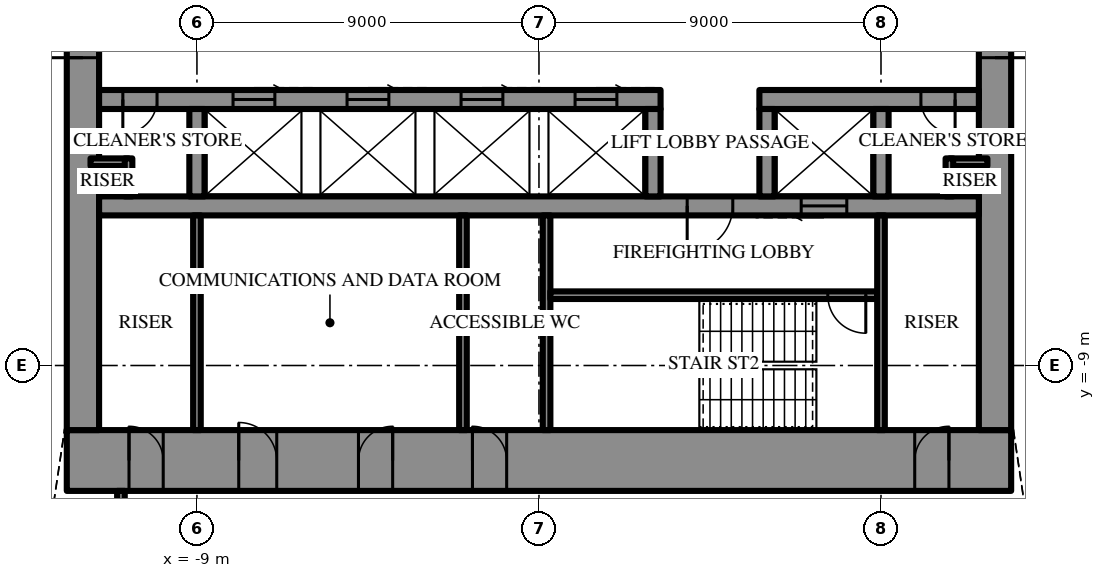
"""IFC4 building model, lengths in metres.
Left out: names, types, materials, properties, quantities, classifications, styles, units other than length and angle.
Written with IfcOpenShell. Run it as: python <this file> out.ifc"""

import sys

from ifc_helpers import new_model, si_unit, direction, frame, frame_2d, origin, place, context, subcontext, project, spatial, rectangle, extrude, element, fill, save


model = new_model("IFC4")
c1 = context("Model", 3, precision=1e-05, world=origin(), true_north=direction((0.0, 1.0)))
c2 = subcontext(c1, "Body", "Model", "MODEL_VIEW")
j1 = project(units=[si_unit("LENGTHUNIT", "METRE"), si_unit("PLANEANGLEUNIT", "RADIAN")], contexts=[c1])
p1 = place(None, origin())
s1 = spatial("IfcSite", under=j1, at=p1, CompositionType="ELEMENT")
p2 = place(p1, origin())
s2 = spatial("IfcBuilding", under=s1, at=p2, CompositionType="ELEMENT")
p3 = place(p2, frame((0.0, 0.0, 315.7)))
s3 = spatial("IfcBuildingStorey", under=s2, at=p3, CompositionType="ELEMENT", Elevation=315.7)
p4 = place(p3, frame((12.425, -11.5, 0.0), z_axis=(0.0, 0.0, 1.0), x_axis=(-1.0, 0.0, 0.0)))
e1 = element("IfcWall", 1, at=p4, inside=s3, PredefinedType="SHEAR", context=c2, shape_type="SweptSolid", body=[
    extrude(rectangle(XDim=24.85, YDim=1.6, at=frame_2d((12.425, 0.0))), origin(), (0.0, 0.0, 1.0), 4.2),
])
p5 = place(p4, frame((13.275, 0.0, 0.0)))
e2 = element("IfcOpeningElement", 2, at=p5, cuts=e1, PredefinedType="OPENING", context=c2, shape_type="SweptSolid", body=[
    extrude(rectangle(XDim=0.9, YDim=2.2, at=frame_2d((0.45, 1.1))), frame((0.0, 0.81, 0.0), z_axis=(0.0, -1.0, 0.0), x_axis=(1.0, 0.0, 0.0)), (0.0, 0.0, 1.0), 1.62),
])
p6 = place(p4, frame((16.275, 0.0, 0.0)))
e3 = element("IfcOpeningElement", 3, at=p6, cuts=e1, PredefinedType="OPENING", context=c2, shape_type="SweptSolid", body=[
    extrude(rectangle(XDim=0.9, YDim=2.2, at=frame_2d((0.45, 1.1))), frame((0.0, 0.81, 0.0), z_axis=(0.0, -1.0, 0.0), x_axis=(1.0, 0.0, 0.0)), (0.0, 0.0, 1.0), 1.62),
])
p7 = place(p4, frame((19.325, 0.0, 0.0)))
e4 = element("IfcOpeningElement", 4, at=p7, cuts=e1, PredefinedType="OPENING", context=c2, shape_type="SweptSolid", body=[
    extrude(rectangle(XDim=1.0, YDim=2.2, at=frame_2d((0.5, 1.1))), frame((0.0, 0.81, 0.0), z_axis=(0.0, -1.0, 0.0), x_axis=(1.0, 0.0, 0.0)), (0.0, 0.0, 1.0), 1.62),
])
p8 = place(p4, frame((1.637, 0.0, 0.0)))
e5 = element("IfcOpeningElement", 5, at=p8, cuts=e1, PredefinedType="OPENING", context=c2, shape_type="SweptSolid", body=[
    extrude(rectangle(XDim=0.9, YDim=2.2, at=frame_2d((0.45, 1.1))), frame((0.0, 0.81, 0.0), z_axis=(0.0, -1.0, 0.0), x_axis=(1.0, 0.0, 0.0)), (0.0, 0.0, 1.0), 1.62),
])
p9 = place(p4, frame((22.312, 0.0, 0.0)))
e6 = element("IfcOpeningElement", 6, at=p9, cuts=e1, PredefinedType="OPENING", context=c2, shape_type="SweptSolid", body=[
    extrude(rectangle(XDim=0.9, YDim=2.2, at=frame_2d((0.45, 1.1))), frame((0.0, 0.81, 0.0), z_axis=(0.0, -1.0, 0.0), x_axis=(1.0, 0.0, 0.0)), (0.0, 0.0, 1.0), 1.62),
])
p10 = place(p3, frame((12.0, -10.7, 0.0), z_axis=(0.0, 0.0, 1.0), x_axis=(0.0, 1.0, 0.0)))
e7 = element("IfcWall", 7, at=p10, inside=s3, PredefinedType="SHEAR", context=c2, shape_type="SweptSolid", body=[
    extrude(rectangle(XDim=21.4, YDim=0.85, at=frame_2d((10.7, 0.0))), origin(), (0.0, 0.0, 1.0), 4.2),
])
p11 = place(p10, frame((9.8, 0.0, 0.0)))
e8 = element("IfcOpeningElement", 8, at=p11, cuts=e7, PredefinedType="OPENING", context=c2, shape_type="SweptSolid", body=[
    extrude(rectangle(XDim=1.8, YDim=2.4, at=frame_2d((0.9, 1.2))), frame((0.0, 0.435, 0.0), z_axis=(0.0, -1.0, 0.0), x_axis=(1.0, 0.0, 0.0)), (0.0, 0.0, 1.0), 0.87),
])
p12 = place(p3, frame((-12.0, 10.7, 0.0), z_axis=(0.0, 0.0, 1.0), x_axis=(0.0, -1.0, 0.0)))
e9 = element("IfcWall", 9, at=p12, inside=s3, PredefinedType="SHEAR", context=c2, shape_type="SweptSolid", body=[
    extrude(rectangle(XDim=21.4, YDim=0.85, at=frame_2d((10.7, 0.0))), origin(), (0.0, 0.0, 1.0), 4.2),
])
p13 = place(p12, frame((9.8, 0.0, 0.0)))
e10 = element("IfcOpeningElement", 10, at=p13, cuts=e9, PredefinedType="OPENING", context=c2, shape_type="SweptSolid", body=[
    extrude(rectangle(XDim=1.8, YDim=2.4, at=frame_2d((0.9, 1.2))), frame((0.0, 0.435, 0.0), z_axis=(0.0, -1.0, 0.0), x_axis=(1.0, 0.0, 0.0)), (0.0, 0.0, 1.0), 0.87),
])
p14 = place(p3, frame((11.575, -2.0, 0.0), z_axis=(0.0, 0.0, 1.0), x_axis=(-1.0, 0.0, 0.0)))
e11 = element("IfcWall", 11, at=p14, inside=s3, PredefinedType="SHEAR", context=c2, shape_type="SweptSolid", body=[
    extrude(rectangle(XDim=5.775, YDim=0.5, at=frame_2d((2.887, 0.0))), origin(), (0.0, 0.0, 1.0), 4.2),
])
p15 = place(p14, frame((0.625, 0.0, 0.0)))
e12 = element("IfcOpeningElement", 12, at=p15, cuts=e11, PredefinedType="OPENING", context=c2, shape_type="SweptSolid", body=[
    extrude(rectangle(XDim=0.9, YDim=2.2, at=frame_2d((0.45, 1.1))), frame((0.0, 0.26, 0.0), z_axis=(0.0, -1.0, 0.0), x_axis=(1.0, 0.0, 0.0)), (0.0, 0.0, 1.0), 0.52),
])
p16 = place(p3, frame((3.2, -2.0, 0.0), z_axis=(0.0, 0.0, 1.0), x_axis=(-1.0, 0.0, 0.0)))
e13 = element("IfcWall", 13, at=p16, inside=s3, PredefinedType="SHEAR", context=c2, shape_type="SweptSolid", body=[
    extrude(rectangle(XDim=14.775, YDim=0.5, at=frame_2d((7.387, 0.0))), origin(), (0.0, 0.0, 1.0), 4.2),
])
p17 = place(p16, frame((13.25, 0.0, 0.0)))
e14 = element("IfcOpeningElement", 14, at=p17, cuts=e13, PredefinedType="OPENING", context=c2, shape_type="SweptSolid", body=[
    extrude(rectangle(XDim=0.9, YDim=2.2, at=frame_2d((0.45, 1.1))), frame((0.0, 0.26, 0.0), z_axis=(0.0, -1.0, 0.0), x_axis=(1.0, 0.0, 0.0)), (0.0, 0.0, 1.0), 0.52),
])
p18 = place(p16, frame((1.15, 0.0, 0.0)))
e15 = element("IfcOpeningElement", 15, at=p18, cuts=e13, PredefinedType="OPENING", context=c2, shape_type="SweptSolid", body=[
    extrude(rectangle(XDim=1.1, YDim=2.2, at=frame_2d((0.55, 1.1))), frame((0.0, 0.26, 0.0), z_axis=(0.0, -1.0, 0.0), x_axis=(1.0, 0.0, 0.0)), (0.0, 0.0, 1.0), 0.52),
])
p19 = place(p16, frame((4.15, 0.0, 0.0)))
e16 = element("IfcOpeningElement", 16, at=p19, cuts=e13, PredefinedType="OPENING", context=c2, shape_type="SweptSolid", body=[
    extrude(rectangle(XDim=1.1, YDim=2.2, at=frame_2d((0.55, 1.1))), frame((0.0, 0.26, 0.0), z_axis=(0.0, -1.0, 0.0), x_axis=(1.0, 0.0, 0.0)), (0.0, 0.0, 1.0), 0.52),
])
p20 = place(p16, frame((7.15, 0.0, 0.0)))
e17 = element("IfcOpeningElement", 17, at=p20, cuts=e13, PredefinedType="OPENING", context=c2, shape_type="SweptSolid", body=[
    extrude(rectangle(XDim=1.1, YDim=2.2, at=frame_2d((0.55, 1.1))), frame((0.0, 0.26, 0.0), z_axis=(0.0, -1.0, 0.0), x_axis=(1.0, 0.0, 0.0)), (0.0, 0.0, 1.0), 0.52),
])
p21 = place(p16, frame((10.15, 0.0, 0.0)))
e18 = element("IfcOpeningElement", 18, at=p21, cuts=e13, PredefinedType="OPENING", context=c2, shape_type="SweptSolid", body=[
    extrude(rectangle(XDim=1.1, YDim=2.2, at=frame_2d((0.55, 1.1))), frame((0.0, 0.26, 0.0), z_axis=(0.0, -1.0, 0.0), x_axis=(1.0, 0.0, 0.0)), (0.0, 0.0, 1.0), 0.52),
])
p22 = place(p3, frame((11.575, -4.8, 0.0), z_axis=(0.0, 0.0, 1.0), x_axis=(-1.0, 0.0, 0.0)))
e19 = element("IfcWall", 19, at=p22, inside=s3, PredefinedType="SHEAR", context=c2, shape_type="SweptSolid", body=[
    extrude(rectangle(XDim=23.15, YDim=0.5, at=frame_2d((11.575, 0.0))), origin(), (0.0, 0.0, 1.0), 4.2),
])
p23 = place(p22, frame((6.475, 0.0, 0.0)))
e20 = element("IfcOpeningElement", 20, at=p23, cuts=e19, PredefinedType="OPENING", context=c2, shape_type="SweptSolid", body=[
    extrude(rectangle(XDim=1.2, YDim=2.2, at=frame_2d((0.6, 1.1))), frame((0.0, 0.26, 0.0), z_axis=(0.0, -1.0, 0.0), x_axis=(1.0, 0.0, 0.0)), (0.0, 0.0, 1.0), 0.52),
])
p24 = place(p22, frame((3.475, 0.0, 0.0)))
e21 = element("IfcOpeningElement", 21, at=p24, cuts=e19, PredefinedType="OPENING", context=c2, shape_type="SweptSolid", body=[
    extrude(rectangle(XDim=1.2, YDim=2.2, at=frame_2d((0.6, 1.1))), frame((0.0, 0.26, 0.0), z_axis=(0.0, -1.0, 0.0), x_axis=(1.0, 0.0, 0.0)), (0.0, 0.0, 1.0), 0.52),
])
for number, where, z_axis, x_axis in (
    (22, (9.0, -2.25, 0.0), (0.0, 0.0, 1.0), (0.0, -1.0, 0.0)),
    (23, (6.0, -2.25, 0.0), (0.0, 0.0, 1.0), (0.0, -1.0, 0.0)),
    (24, (3.0, -2.25, 0.0), (0.0, 0.0, 1.0), (0.0, -1.0, 0.0)),
    (25, (-9.0, -2.25, 0.0), (0.0, 0.0, 1.0), (0.0, -1.0, 0.0)),
):
    element("IfcWall", number, at=place(p3, frame(where, z_axis=z_axis, x_axis=x_axis)), inside=s3, PredefinedType="SHEAR", context=c2, shape_type="SweptSolid", body=[
        extrude(rectangle(XDim=2.3, YDim=0.4, at=frame_2d((1.15, 0.0))), origin(), (0.0, 0.0, 1.0), 4.2),
    ])
p25 = place(p3, frame((0.2, -5.05, 0.0), z_axis=(0.0, 0.0, 1.0), x_axis=(0.0, -1.0, 0.0)))
e26 = element("IfcWall", 26, at=p25, inside=s3, PredefinedType="SHEAR", context=c2, shape_type="SweptSolid", body=[
    extrude(rectangle(XDim=5.65, YDim=0.2, at=frame_2d((2.825, 0.0))), origin(), (0.0, 0.0, 1.0), 4.2),
])
p26 = place(p3, frame((8.9, -7.15, 0.0), z_axis=(0.0, 0.0, 1.0), x_axis=(-1.0, 0.0, 0.0)))
e27 = element("IfcWall", 27, at=p26, inside=s3, PredefinedType="SHEAR", context=c2, shape_type="SweptSolid", body=[
    extrude(rectangle(XDim=8.6, YDim=0.2, at=frame_2d((4.3, 0.0))), origin(), (0.0, 0.0, 1.0), 4.2),
])
p27 = place(p26, frame((0.3, 0.0, 0.0)))
e28 = element("IfcOpeningElement", 28, at=p27, cuts=e27, PredefinedType="OPENING", context=c2, shape_type="SweptSolid", body=[
    extrude(rectangle(XDim=1.0, YDim=2.2, at=frame_2d((0.5, 1.1))), frame((0.0, 0.11, 0.0), z_axis=(0.0, -1.0, 0.0), x_axis=(1.0, 0.0, 0.0)), (0.0, 0.0, 1.0), 0.22),
])
for number, where, z_axis, x_axis in (
    (29, (9.0, -5.05, 0.0), (0.0, 0.0, 1.0), (0.0, -1.0, 0.0)),
    (30, (-9.0, -5.05, 0.0), (0.0, 0.0, 1.0), (0.0, -1.0, 0.0)),
    (31, (-2.0, -5.05, 0.0), (0.0, 0.0, 1.0), (0.0, -1.0, 0.0)),
):
    element("IfcWall", number, at=place(p3, frame(where, z_axis=z_axis, x_axis=x_axis)), inside=s3, PredefinedType="PARTITIONING", context=c2, shape_type="SweptSolid", body=[
        extrude(rectangle(XDim=5.65, YDim=0.2, at=frame_2d((2.825, 0.0))), origin(), (0.0, 0.0, 1.0), 4.0),
    ])
for number, where, z_axis, x_axis in (
    (32, (11.8, -3.65, 0.0), (0.0, 0.0, 1.0), (-1.0, 0.0, 0.0)),
    (33, (10.8, -3.55, 0.0), (0.0, 0.0, 1.0), (0.0, -1.0, 0.0)),
    (34, (-10.8, -3.65, 0.0), (0.0, 0.0, 1.0), (-1.0, 0.0, 0.0)),
    (35, (-10.8, -3.55, 0.0), (0.0, 0.0, 1.0), (0.0, -1.0, 0.0)),
):
    element("IfcWall", number, at=place(p3, frame(where, z_axis=z_axis, x_axis=x_axis)), inside=s3, PredefinedType="PARTITIONING", context=c2, shape_type="SweptSolid", body=[
        extrude(rectangle(XDim=1.0, YDim=0.2, at=frame_2d((0.5, 0.0))), origin(), (0.0, 0.0, 1.0), 4.0),
    ])
p28 = place(p3, frame((-11.0, -12.3, 0.0), z_axis=(0.0, 0.0, 1.0), x_axis=(0.0, -1.0, 0.0)))
e36 = element("IfcWall", 36, at=p28, inside=s3, PredefinedType="PARTITIONING", context=c2, shape_type="SweptSolid", body=[
    extrude(rectangle(XDim=14.25, YDim=0.2, at=frame_2d((7.125, 0.0))), origin(), (0.0, 0.0, 1.0), 4.0),
])
p29 = place(p28, frame((0.925, 0.0, 0.0)))
e37 = element("IfcOpeningElement", 37, at=p29, cuts=e36, PredefinedType="OPENING", context=c2, shape_type="SweptSolid", body=[
    extrude(rectangle(XDim=1.0, YDim=2.2, at=frame_2d((0.5, 1.1))), frame((0.0, 0.11, 0.0), z_axis=(0.0, -1.0, 0.0), x_axis=(1.0, 0.0, 0.0)), (0.0, 0.0, 1.0), 0.22),
])
p30 = place(p11, frame((1.8, 0.0, 0.0), z_axis=(0.0, 0.0, 1.0), x_axis=(-1.0, 0.0, 0.0)))
e38 = element("IfcDoor", 38, at=p30, inside=s3, OperationType="DOUBLE_DOOR_SINGLE_SWING", PredefinedType="DOOR", context=c2, shape_type="SweptSolid", body=[
    extrude(rectangle(XDim=1.8, YDim=2.4, at=frame_2d((0.9, 1.2))), frame((0.0, 0.025, 0.0), z_axis=(0.0, -1.0, 0.0), x_axis=(1.0, 0.0, 0.0)), (0.0, 0.0, 1.0), 0.05),
])
fill(e8, e38)
p31 = place(p13, frame((1.8, 0.0, 0.0), z_axis=(0.0, 0.0, 1.0), x_axis=(-1.0, 0.0, 0.0)))
e39 = element("IfcDoor", 39, at=p31, inside=s3, OperationType="DOUBLE_DOOR_SINGLE_SWING", PredefinedType="DOOR", context=c2, shape_type="SweptSolid", body=[
    extrude(rectangle(XDim=1.8, YDim=2.4, at=frame_2d((0.9, 1.2))), frame((0.0, 0.025, 0.0), z_axis=(0.0, -1.0, 0.0), x_axis=(1.0, 0.0, 0.0)), (0.0, 0.0, 1.0), 0.05),
])
fill(e10, e39)
p32 = place(p23, origin())
e40 = element("IfcDoor", 40, at=p32, inside=s3, OperationType="SINGLE_SWING_LEFT", PredefinedType="DOOR", context=c2, shape_type="SweptSolid", body=[
    extrude(rectangle(XDim=1.2, YDim=2.2, at=frame_2d((0.6, 1.1))), frame((0.0, 0.025, 0.0), z_axis=(0.0, -1.0, 0.0), x_axis=(1.0, 0.0, 0.0)), (0.0, 0.0, 1.0), 0.05),
])
fill(e20, e40)
p33 = place(p27, origin())
e41 = element("IfcDoor", 41, at=p33, inside=s3, OperationType="SINGLE_SWING_RIGHT", PredefinedType="DOOR", context=c2, shape_type="SweptSolid", body=[
    extrude(rectangle(XDim=1.0, YDim=2.2, at=frame_2d((0.5, 1.1))), frame((0.0, 0.025, 0.0), z_axis=(0.0, -1.0, 0.0), x_axis=(1.0, 0.0, 0.0)), (0.0, 0.0, 1.0), 0.05),
])
fill(e28, e41)
p34 = place(p5, frame((0.9, 0.0, 0.0), z_axis=(0.0, 0.0, 1.0), x_axis=(-1.0, 0.0, 0.0)))
e42 = element("IfcDoor", 42, at=p34, inside=s3, OperationType="SINGLE_SWING_RIGHT", PredefinedType="DOOR", context=c2, shape_type="SweptSolid", body=[
    extrude(rectangle(XDim=0.9, YDim=2.2, at=frame_2d((0.45, 1.1))), frame((0.0, 0.025, 0.0), z_axis=(0.0, -1.0, 0.0), x_axis=(1.0, 0.0, 0.0)), (0.0, 0.0, 1.0), 0.05),
])
fill(e2, e42)
p35 = place(p6, frame((0.9, 0.0, 0.0), z_axis=(0.0, 0.0, 1.0), x_axis=(-1.0, 0.0, 0.0)))
e43 = element("IfcDoor", 43, at=p35, inside=s3, OperationType="SINGLE_SWING_LEFT", PredefinedType="DOOR", context=c2, shape_type="SweptSolid", body=[
    extrude(rectangle(XDim=0.9, YDim=2.2, at=frame_2d((0.45, 1.1))), frame((0.0, 0.025, 0.0), z_axis=(0.0, -1.0, 0.0), x_axis=(1.0, 0.0, 0.0)), (0.0, 0.0, 1.0), 0.05),
])
fill(e3, e43)
p36 = place(p7, frame((1.0, 0.0, 0.0), z_axis=(0.0, 0.0, 1.0), x_axis=(-1.0, 0.0, 0.0)))
e44 = element("IfcDoor", 44, at=p36, inside=s3, OperationType="SINGLE_SWING_RIGHT", PredefinedType="DOOR", context=c2, shape_type="SweptSolid", body=[
    extrude(rectangle(XDim=1.0, YDim=2.2, at=frame_2d((0.5, 1.1))), frame((0.0, 0.025, 0.0), z_axis=(0.0, -1.0, 0.0), x_axis=(1.0, 0.0, 0.0)), (0.0, 0.0, 1.0), 0.05),
])
fill(e4, e44)
p37 = place(p8, frame((0.9, 0.0, 0.0), z_axis=(0.0, 0.0, 1.0), x_axis=(-1.0, 0.0, 0.0)))
e45 = element("IfcDoor", 45, at=p37, inside=s3, OperationType="SINGLE_SWING_LEFT", PredefinedType="DOOR", context=c2, shape_type="SweptSolid", body=[
    extrude(rectangle(XDim=0.9, YDim=2.2, at=frame_2d((0.45, 1.1))), frame((0.0, 0.025, 0.0), z_axis=(0.0, -1.0, 0.0), x_axis=(1.0, 0.0, 0.0)), (0.0, 0.0, 1.0), 0.05),
])
fill(e5, e45)
p38 = place(p9, frame((0.9, 0.0, 0.0), z_axis=(0.0, 0.0, 1.0), x_axis=(-1.0, 0.0, 0.0)))
e46 = element("IfcDoor", 46, at=p38, inside=s3, OperationType="SINGLE_SWING_RIGHT", PredefinedType="DOOR", context=c2, shape_type="SweptSolid", body=[
    extrude(rectangle(XDim=0.9, YDim=2.2, at=frame_2d((0.45, 1.1))), frame((0.0, 0.025, 0.0), z_axis=(0.0, -1.0, 0.0), x_axis=(1.0, 0.0, 0.0)), (0.0, 0.0, 1.0), 0.05),
])
fill(e6, e46)
p39 = place(p15, origin())
e47 = element("IfcDoor", 47, at=p39, inside=s3, OperationType="SINGLE_SWING_RIGHT", PredefinedType="DOOR", context=c2, shape_type="SweptSolid", body=[
    extrude(rectangle(XDim=0.9, YDim=2.2, at=frame_2d((0.45, 1.1))), frame((0.0, 0.025, 0.0), z_axis=(0.0, -1.0, 0.0), x_axis=(1.0, 0.0, 0.0)), (0.0, 0.0, 1.0), 0.05),
])
fill(e12, e47)
p40 = place(p17, origin())
e48 = element("IfcDoor", 48, at=p40, inside=s3, OperationType="SINGLE_SWING_LEFT", PredefinedType="DOOR", context=c2, shape_type="SweptSolid", body=[
    extrude(rectangle(XDim=0.9, YDim=2.2, at=frame_2d((0.45, 1.1))), frame((0.0, 0.025, 0.0), z_axis=(0.0, -1.0, 0.0), x_axis=(1.0, 0.0, 0.0)), (0.0, 0.0, 1.0), 0.05),
])
fill(e14, e48)
p41 = place(p24, origin())
e49 = element("IfcDoor", 49, at=p41, inside=s3, OperationType="SLIDING_TO_LEFT", PredefinedType="DOOR", context=c2, shape_type="SweptSolid", body=[
    extrude(rectangle(XDim=1.2, YDim=2.2, at=frame_2d((0.6, 1.1))), frame((0.0, 0.025, 0.0), z_axis=(0.0, -1.0, 0.0), x_axis=(1.0, 0.0, 0.0)), (0.0, 0.0, 1.0), 0.05),
])
fill(e21, e49)
p42 = place(p18, frame((1.1, 0.0, 0.0), z_axis=(0.0, 0.0, 1.0), x_axis=(-1.0, 0.0, 0.0)))
e50 = element("IfcDoor", 50, at=p42, inside=s3, OperationType="SLIDING_TO_LEFT", PredefinedType="DOOR", context=c2, shape_type="SweptSolid", body=[
    extrude(rectangle(XDim=1.1, YDim=2.2, at=frame_2d((0.55, 1.1))), frame((0.0, 0.025, 0.0), z_axis=(0.0, -1.0, 0.0), x_axis=(1.0, 0.0, 0.0)), (0.0, 0.0, 1.0), 0.05),
])
fill(e15, e50)
p43 = place(p19, frame((1.1, 0.0, 0.0), z_axis=(0.0, 0.0, 1.0), x_axis=(-1.0, 0.0, 0.0)))
e51 = element("IfcDoor", 51, at=p43, inside=s3, OperationType="SLIDING_TO_LEFT", PredefinedType="DOOR", context=c2, shape_type="SweptSolid", body=[
    extrude(rectangle(XDim=1.1, YDim=2.2, at=frame_2d((0.55, 1.1))), frame((0.0, 0.025, 0.0), z_axis=(0.0, -1.0, 0.0), x_axis=(1.0, 0.0, 0.0)), (0.0, 0.0, 1.0), 0.05),
])
fill(e16, e51)
p44 = place(p20, frame((1.1, 0.0, 0.0), z_axis=(0.0, 0.0, 1.0), x_axis=(-1.0, 0.0, 0.0)))
e52 = element("IfcDoor", 52, at=p44, inside=s3, OperationType="SLIDING_TO_LEFT", PredefinedType="DOOR", context=c2, shape_type="SweptSolid", body=[
    extrude(rectangle(XDim=1.1, YDim=2.2, at=frame_2d((0.55, 1.1))), frame((0.0, 0.025, 0.0), z_axis=(0.0, -1.0, 0.0), x_axis=(1.0, 0.0, 0.0)), (0.0, 0.0, 1.0), 0.05),
])
fill(e17, e52)
p45 = place(p21, frame((1.1, 0.0, 0.0), z_axis=(0.0, 0.0, 1.0), x_axis=(-1.0, 0.0, 0.0)))
e53 = element("IfcDoor", 53, at=p45, inside=s3, OperationType="SLIDING_TO_LEFT", PredefinedType="DOOR", context=c2, shape_type="SweptSolid", body=[
    extrude(rectangle(XDim=1.1, YDim=2.2, at=frame_2d((0.55, 1.1))), frame((0.0, 0.025, 0.0), z_axis=(0.0, -1.0, 0.0), x_axis=(1.0, 0.0, 0.0)), (0.0, 0.0, 1.0), 0.05),
])
fill(e18, e53)
save(model, sys.argv[1])
